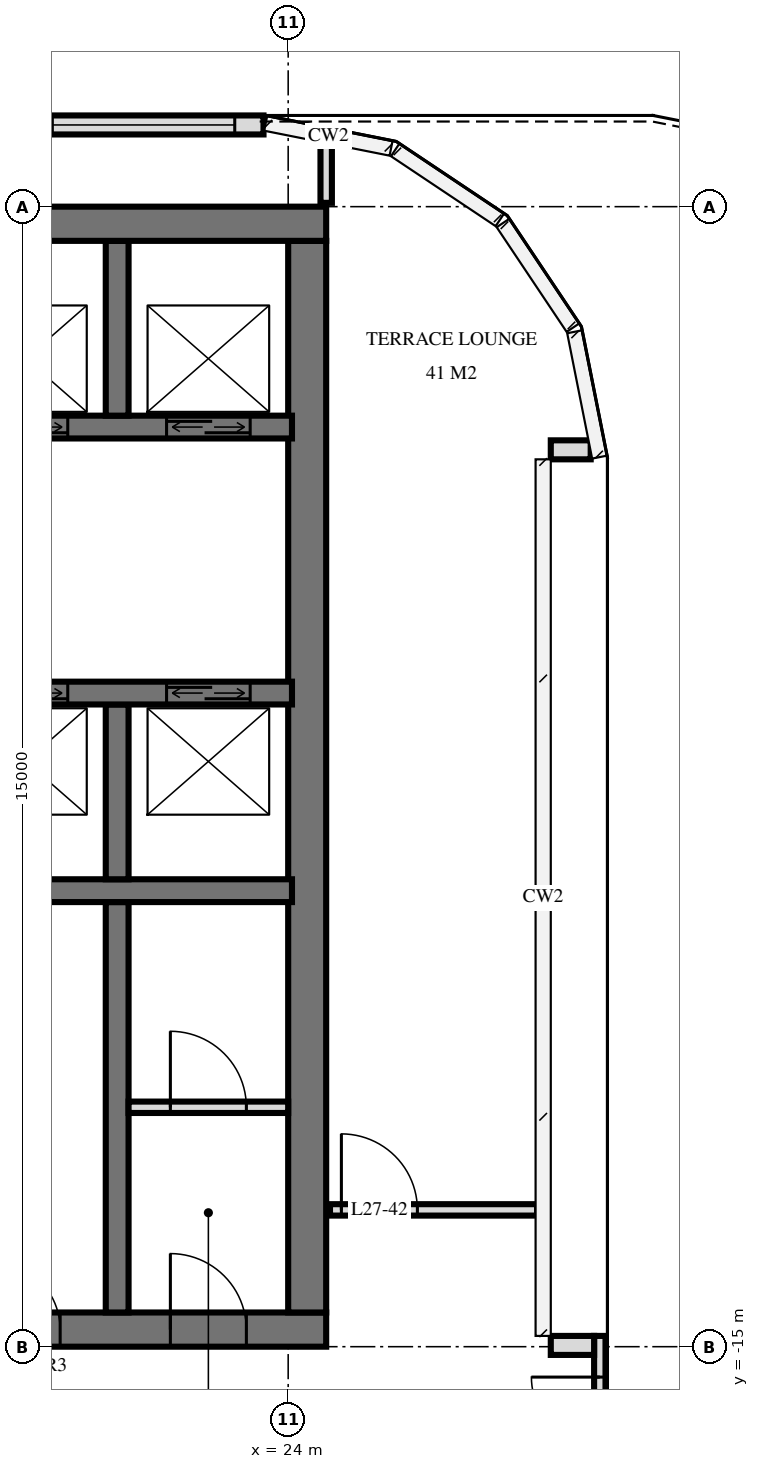
"""IFC4 building model, lengths in metres.
Left out: names, types, materials, properties, quantities, classifications, styles, units other than length and angle.
Written with IfcOpenShell. Run it as: python <this file> out.ifc"""

import sys

from ifc_helpers import new_model, si_unit, direction, frame, frame_2d, origin, place, context, subcontext, project, spatial, rectangle, extrude, element, fill, save


model = new_model("IFC4")
c1 = context("Model", 3, precision=1e-05, world=origin(), true_north=direction((0.0, 1.0)))
c2 = subcontext(c1, "Body", "Model", "MODEL_VIEW")
j1 = project(units=[si_unit("LENGTHUNIT", "METRE"), si_unit("PLANEANGLEUNIT", "RADIAN")], contexts=[c1])
p1 = place(None, origin())
s1 = spatial("IfcSite", under=j1, at=p1, CompositionType="ELEMENT")
p2 = place(p1, origin())
s2 = spatial("IfcBuilding", under=s1, at=p2, CompositionType="ELEMENT")
p3 = place(p2, frame((0.0, 0.0, 106.8)))
s3 = spatial("IfcBuildingStorey", under=s2, at=p3, CompositionType="ELEMENT", Elevation=106.8)
p4 = place(p3, frame((10.0, -0.225, 0.0), z_axis=(0.0, 0.0, 1.0), x_axis=(1.0, 0.0, 0.0)))
e1 = element("IfcWall", 1, at=p4, inside=s3, PredefinedType="SHEAR", context=c2, shape_type="SweptSolid", body=[
    extrude(rectangle(XDim=14.5, YDim=0.45, at=frame_2d((7.25, 0.0))), origin(), (0.0, 0.0, 1.0), 6.0),
])
p5 = place(p3, frame((10.0, -14.775, 0.0), z_axis=(0.0, 0.0, 1.0), x_axis=(1.0, 0.0, 0.0)))
e2 = element("IfcWall", 2, at=p5, inside=s3, PredefinedType="SHEAR", context=c2, shape_type="SweptSolid", body=[
    extrude(rectangle(XDim=14.5, YDim=0.45, at=frame_2d((7.25, 0.0))), origin(), (0.0, 0.0, 1.0), 6.0),
])
p6 = place(p5, frame((6.5, 0.0, 0.0)))
e3 = element("IfcOpeningElement", 3, at=p6, cuts=e2, PredefinedType="OPENING", context=c2, shape_type="SweptSolid", body=[
    extrude(rectangle(XDim=1.2, YDim=2.1, at=frame_2d((0.6, 1.05))), frame((0.0, 0.235, 0.0), z_axis=(0.0, -1.0, 0.0), x_axis=(1.0, 0.0, 0.0)), (0.0, 0.0, 1.0), 0.47),
])
p7 = place(p5, frame((4.15, 0.0, 0.0)))
e4 = element("IfcOpeningElement", 4, at=p7, cuts=e2, PredefinedType="OPENING", context=c2, shape_type="SweptSolid", body=[
    extrude(rectangle(XDim=1.1, YDim=2.1, at=frame_2d((0.55, 1.05))), frame((0.0, 0.235, 0.0), z_axis=(0.0, -1.0, 0.0), x_axis=(1.0, 0.0, 0.0)), (0.0, 0.0, 1.0), 0.47),
])
p8 = place(p5, frame((10.1, 0.0, 0.0)))
e5 = element("IfcOpeningElement", 5, at=p8, cuts=e2, PredefinedType="OPENING", context=c2, shape_type="SweptSolid", body=[
    extrude(rectangle(XDim=0.9, YDim=2.1, at=frame_2d((0.45, 1.05))), frame((0.0, 0.235, 0.0), z_axis=(0.0, -1.0, 0.0), x_axis=(1.0, 0.0, 0.0)), (0.0, 0.0, 1.0), 0.47),
])
p9 = place(p5, frame((12.45, 0.0, 0.0)))
e6 = element("IfcOpeningElement", 6, at=p9, cuts=e2, PredefinedType="OPENING", context=c2, shape_type="SweptSolid", body=[
    extrude(rectangle(XDim=1.0, YDim=2.1, at=frame_2d((0.5, 1.05))), frame((0.0, 0.235, 0.0), z_axis=(0.0, -1.0, 0.0), x_axis=(1.0, 0.0, 0.0)), (0.0, 0.0, 1.0), 0.47),
])
p10 = place(p3, frame((24.25, -14.55, 0.0), z_axis=(0.0, 0.0, 1.0), x_axis=(0.0, 1.0, 0.0)))
e7 = element("IfcWall", 7, at=p10, inside=s3, PredefinedType="SHEAR", context=c2, shape_type="SweptSolid", body=[
    extrude(rectangle(XDim=14.1, YDim=0.5, at=frame_2d((7.05, 0.0))), origin(), (0.0, 0.0, 1.0), 6.0),
])
p11 = place(p3, frame((10.35, -2.9, 0.0), z_axis=(0.0, 0.0, 1.0), x_axis=(1.0, 0.0, 0.0)))
e8 = element("IfcWall", 8, at=p11, inside=s3, PredefinedType="SHEAR", context=c2, shape_type="SweptSolid", body=[
    extrude(rectangle(XDim=13.7, YDim=0.3, at=frame_2d((6.85, 0.0))), origin(), (0.0, 0.0, 1.0), 6.0),
])
p12 = place(p11, frame((9.65, 0.0, 0.0)))
e9 = element("IfcOpeningElement", 9, at=p12, cuts=e8, PredefinedType="OPENING", context=c2, shape_type="SweptSolid", body=[
    extrude(rectangle(XDim=1.1, YDim=2.1, at=frame_2d((0.55, 1.05))), frame((0.0, 0.16, 0.0), z_axis=(0.0, -1.0, 0.0), x_axis=(1.0, 0.0, 0.0)), (0.0, 0.0, 1.0), 0.32),
])
p13 = place(p11, frame((12.05, 0.0, 0.0)))
e10 = element("IfcOpeningElement", 10, at=p13, cuts=e8, PredefinedType="OPENING", context=c2, shape_type="SweptSolid", body=[
    extrude(rectangle(XDim=1.1, YDim=2.1, at=frame_2d((0.55, 1.05))), frame((0.0, 0.16, 0.0), z_axis=(0.0, -1.0, 0.0), x_axis=(1.0, 0.0, 0.0)), (0.0, 0.0, 1.0), 0.32),
])
p14 = place(p11, frame((6.188, 0.0, 0.0)))
e11 = element("IfcOpeningElement", 11, at=p14, cuts=e8, PredefinedType="OPENING", context=c2, shape_type="SweptSolid", body=[
    extrude(rectangle(XDim=0.9, YDim=2.1, at=frame_2d((0.45, 1.05))), frame((0.0, 0.16, 0.0), z_axis=(0.0, -1.0, 0.0), x_axis=(1.0, 0.0, 0.0)), (0.0, 0.0, 1.0), 0.32),
])
p15 = place(p11, frame((7.613, 0.0, 0.0)))
e12 = element("IfcOpeningElement", 12, at=p15, cuts=e8, PredefinedType="OPENING", context=c2, shape_type="SweptSolid", body=[
    extrude(rectangle(XDim=0.9, YDim=2.1, at=frame_2d((0.45, 1.05))), frame((0.0, 0.16, 0.0), z_axis=(0.0, -1.0, 0.0), x_axis=(1.0, 0.0, 0.0)), (0.0, 0.0, 1.0), 0.32),
])
p16 = place(p11, frame((0.137, 0.0, 0.0)))
e13 = element("IfcOpeningElement", 13, at=p16, cuts=e8, PredefinedType="OPENING", context=c2, shape_type="SweptSolid", body=[
    extrude(rectangle(XDim=1.0, YDim=2.1, at=frame_2d((0.5, 1.05))), frame((0.0, 0.16, 0.0), z_axis=(0.0, -1.0, 0.0), x_axis=(1.0, 0.0, 0.0)), (0.0, 0.0, 1.0), 0.32),
])
p17 = place(p11, frame((1.562, 0.0, 0.0)))
e14 = element("IfcOpeningElement", 14, at=p17, cuts=e8, PredefinedType="OPENING", context=c2, shape_type="SweptSolid", body=[
    extrude(rectangle(XDim=1.0, YDim=2.1, at=frame_2d((0.5, 1.05))), frame((0.0, 0.16, 0.0), z_axis=(0.0, -1.0, 0.0), x_axis=(1.0, 0.0, 0.0)), (0.0, 0.0, 1.0), 0.32),
])
p18 = place(p11, frame((3.85, 0.0, 0.0)))
e15 = element("IfcOpeningElement", 15, at=p18, cuts=e8, PredefinedType="OPENING", context=c2, shape_type="SweptSolid", body=[
    extrude(rectangle(XDim=1.0, YDim=2.1, at=frame_2d((0.5, 1.05))), frame((0.0, 0.16, 0.0), z_axis=(0.0, -1.0, 0.0), x_axis=(1.0, 0.0, 0.0)), (0.0, 0.0, 1.0), 0.32),
])
p19 = place(p3, frame((10.35, -6.4, 0.0), z_axis=(0.0, 0.0, 1.0), x_axis=(1.0, 0.0, 0.0)))
e16 = element("IfcWall", 16, at=p19, inside=s3, PredefinedType="SHEAR", context=c2, shape_type="SweptSolid", body=[
    extrude(rectangle(XDim=13.7, YDim=0.3, at=frame_2d((6.85, 0.0))), origin(), (0.0, 0.0, 1.0), 6.0),
])
p20 = place(p19, frame((9.65, 0.0, 0.0)))
e17 = element("IfcOpeningElement", 17, at=p20, cuts=e16, PredefinedType="OPENING", context=c2, shape_type="SweptSolid", body=[
    extrude(rectangle(XDim=1.1, YDim=2.1, at=frame_2d((0.55, 1.05))), frame((0.0, 0.16, 0.0), z_axis=(0.0, -1.0, 0.0), x_axis=(1.0, 0.0, 0.0)), (0.0, 0.0, 1.0), 0.32),
])
p21 = place(p19, frame((12.05, 0.0, 0.0)))
e18 = element("IfcOpeningElement", 18, at=p21, cuts=e16, PredefinedType="OPENING", context=c2, shape_type="SweptSolid", body=[
    extrude(rectangle(XDim=1.1, YDim=2.1, at=frame_2d((0.55, 1.05))), frame((0.0, 0.16, 0.0), z_axis=(0.0, -1.0, 0.0), x_axis=(1.0, 0.0, 0.0)), (0.0, 0.0, 1.0), 0.32),
])
p22 = place(p19, frame((6.8, 0.0, 0.0)))
e19 = element("IfcOpeningElement", 19, at=p22, cuts=e16, PredefinedType="OPENING", context=c2, shape_type="SweptSolid", body=[
    extrude(rectangle(XDim=1.1, YDim=2.1, at=frame_2d((0.55, 1.05))), frame((0.0, 0.16, 0.0), z_axis=(0.0, -1.0, 0.0), x_axis=(1.0, 0.0, 0.0)), (0.0, 0.0, 1.0), 0.32),
])
p23 = place(p3, frame((10.35, -9.0, 0.0), z_axis=(0.0, 0.0, 1.0), x_axis=(1.0, 0.0, 0.0)))
e20 = element("IfcWall", 20, at=p23, inside=s3, PredefinedType="SHEAR", context=c2, shape_type="SweptSolid", body=[
    extrude(rectangle(XDim=13.7, YDim=0.3, at=frame_2d((6.85, 0.0))), origin(), (0.0, 0.0, 1.0), 6.0),
])
p24 = place(p23, frame((3.8, 0.0, 0.0)))
e21 = element("IfcOpeningElement", 21, at=p24, cuts=e20, PredefinedType="OPENING", context=c2, shape_type="SweptSolid", body=[
    extrude(rectangle(XDim=1.1, YDim=2.1, at=frame_2d((0.55, 1.05))), frame((0.0, 0.16, 0.0), z_axis=(0.0, -1.0, 0.0), x_axis=(1.0, 0.0, 0.0)), (0.0, 0.0, 1.0), 0.32),
])
for number, where, z_axis, x_axis in (
    (22, (21.75, -2.75, 0.0), (0.0, 0.0, 1.0), (0.0, 1.0, 0.0)),
    (23, (21.75, -8.85, 0.0), (0.0, 0.0, 1.0), (0.0, 1.0, 0.0)),
):
    element("IfcWall", number, at=place(p3, frame(where, z_axis=z_axis, x_axis=x_axis)), inside=s3, PredefinedType="SHEAR", context=c2, shape_type="SweptSolid", body=[
        extrude(rectangle(XDim=2.3, YDim=0.3, at=frame_2d((1.15, 0.0))), origin(), (0.0, 0.0, 1.0), 6.0),
    ])
p25 = place(p3, frame((21.75, -14.55, 0.0), z_axis=(0.0, 0.0, 1.0), x_axis=(0.0, 1.0, 0.0)))
e24 = element("IfcWall", 24, at=p25, inside=s3, PredefinedType="SHEAR", context=c2, shape_type="SweptSolid", body=[
    extrude(rectangle(XDim=5.4, YDim=0.3, at=frame_2d((2.7, 0.0))), origin(), (0.0, 0.0, 1.0), 6.0),
])
p26 = place(p3, frame((23.675, 1.075, 0.0), z_axis=(0.0, 0.0, 1.0), x_axis=(-1.0, 0.0, 0.0)))
e25 = element("IfcWall", 25, at=p26, inside=s3, PredefinedType="SOLIDWALL", context=c2, shape_type="SweptSolid", body=[
    extrude(rectangle(XDim=47.351, YDim=0.25, at=frame_2d((23.675, 0.0))), origin(), (0.0, 0.0, 1.0), 5.72),
])
p27 = place(p26, frame((0.378, 0.0, 0.858)))
e26 = element("IfcOpeningElement", 26, at=p27, cuts=e25, PredefinedType="OPENING", context=c2, shape_type="SweptSolid", body=[
    extrude(rectangle(XDim=2.4, YDim=3.6, at=frame_2d((1.2, 1.8))), frame((0.0, 0.135, 0.0), z_axis=(0.0, -1.0, 0.0), x_axis=(1.0, 0.0, 0.0)), (0.0, 0.0, 1.0), 0.27),
])
p28 = place(p26, frame((3.535, 0.0, 0.858)))
e27 = element("IfcOpeningElement", 27, at=p28, cuts=e25, PredefinedType="OPENING", context=c2, shape_type="SweptSolid", body=[
    extrude(rectangle(XDim=2.4, YDim=3.6, at=frame_2d((1.2, 1.8))), frame((0.0, 0.135, 0.0), z_axis=(0.0, -1.0, 0.0), x_axis=(1.0, 0.0, 0.0)), (0.0, 0.0, 1.0), 0.27),
])
p29 = place(p26, frame((6.692, 0.0, 0.858)))
e28 = element("IfcOpeningElement", 28, at=p29, cuts=e25, PredefinedType="OPENING", context=c2, shape_type="SweptSolid", body=[
    extrude(rectangle(XDim=2.4, YDim=3.6, at=frame_2d((1.2, 1.8))), frame((0.0, 0.135, 0.0), z_axis=(0.0, -1.0, 0.0), x_axis=(1.0, 0.0, 0.0)), (0.0, 0.0, 1.0), 0.27),
])
p30 = place(p26, frame((9.848, 0.0, 0.858)))
e29 = element("IfcOpeningElement", 29, at=p30, cuts=e25, PredefinedType="OPENING", context=c2, shape_type="SweptSolid", body=[
    extrude(rectangle(XDim=2.4, YDim=3.6, at=frame_2d((1.2, 1.8))), frame((0.0, 0.135, 0.0), z_axis=(0.0, -1.0, 0.0), x_axis=(1.0, 0.0, 0.0)), (0.0, 0.0, 1.0), 0.27),
])
p31 = place(p26, frame((13.005, 0.0, 0.858)))
e30 = element("IfcOpeningElement", 30, at=p31, cuts=e25, PredefinedType="OPENING", context=c2, shape_type="SweptSolid", body=[
    extrude(rectangle(XDim=2.4, YDim=3.6, at=frame_2d((1.2, 1.8))), frame((0.0, 0.135, 0.0), z_axis=(0.0, -1.0, 0.0), x_axis=(1.0, 0.0, 0.0)), (0.0, 0.0, 1.0), 0.27),
])
p32 = place(p26, frame((16.162, 0.0, 0.858)))
e31 = element("IfcOpeningElement", 31, at=p32, cuts=e25, PredefinedType="OPENING", context=c2, shape_type="SweptSolid", body=[
    extrude(rectangle(XDim=2.4, YDim=3.6, at=frame_2d((1.2, 1.8))), frame((0.0, 0.135, 0.0), z_axis=(0.0, -1.0, 0.0), x_axis=(1.0, 0.0, 0.0)), (0.0, 0.0, 1.0), 0.27),
])
p33 = place(p26, frame((19.319, 0.0, 0.858)))
e32 = element("IfcOpeningElement", 32, at=p33, cuts=e25, PredefinedType="OPENING", context=c2, shape_type="SweptSolid", body=[
    extrude(rectangle(XDim=2.4, YDim=3.6, at=frame_2d((1.2, 1.8))), frame((0.0, 0.135, 0.0), z_axis=(0.0, -1.0, 0.0), x_axis=(1.0, 0.0, 0.0)), (0.0, 0.0, 1.0), 0.27),
])
p34 = place(p26, frame((22.475, 0.0, 0.858)))
e33 = element("IfcOpeningElement", 33, at=p34, cuts=e25, PredefinedType="OPENING", context=c2, shape_type="SweptSolid", body=[
    extrude(rectangle(XDim=2.4, YDim=3.6, at=frame_2d((1.2, 1.8))), frame((0.0, 0.135, 0.0), z_axis=(0.0, -1.0, 0.0), x_axis=(1.0, 0.0, 0.0)), (0.0, 0.0, 1.0), 0.27),
])
p35 = place(p26, frame((25.632, 0.0, 0.858)))
e34 = element("IfcOpeningElement", 34, at=p35, cuts=e25, PredefinedType="OPENING", context=c2, shape_type="SweptSolid", body=[
    extrude(rectangle(XDim=2.4, YDim=3.6, at=frame_2d((1.2, 1.8))), frame((0.0, 0.135, 0.0), z_axis=(0.0, -1.0, 0.0), x_axis=(1.0, 0.0, 0.0)), (0.0, 0.0, 1.0), 0.27),
])
p36 = place(p26, frame((28.789, 0.0, 0.858)))
e35 = element("IfcOpeningElement", 35, at=p36, cuts=e25, PredefinedType="OPENING", context=c2, shape_type="SweptSolid", body=[
    extrude(rectangle(XDim=2.4, YDim=3.6, at=frame_2d((1.2, 1.8))), frame((0.0, 0.135, 0.0), z_axis=(0.0, -1.0, 0.0), x_axis=(1.0, 0.0, 0.0)), (0.0, 0.0, 1.0), 0.27),
])
p37 = place(p26, frame((31.946, 0.0, 0.858)))
e36 = element("IfcOpeningElement", 36, at=p37, cuts=e25, PredefinedType="OPENING", context=c2, shape_type="SweptSolid", body=[
    extrude(rectangle(XDim=2.4, YDim=3.6, at=frame_2d((1.2, 1.8))), frame((0.0, 0.135, 0.0), z_axis=(0.0, -1.0, 0.0), x_axis=(1.0, 0.0, 0.0)), (0.0, 0.0, 1.0), 0.27),
])
p38 = place(p26, frame((35.102, 0.0, 0.858)))
e37 = element("IfcOpeningElement", 37, at=p38, cuts=e25, PredefinedType="OPENING", context=c2, shape_type="SweptSolid", body=[
    extrude(rectangle(XDim=2.4, YDim=3.6, at=frame_2d((1.2, 1.8))), frame((0.0, 0.135, 0.0), z_axis=(0.0, -1.0, 0.0), x_axis=(1.0, 0.0, 0.0)), (0.0, 0.0, 1.0), 0.27),
])
p39 = place(p26, frame((38.259, 0.0, 0.858)))
e38 = element("IfcOpeningElement", 38, at=p39, cuts=e25, PredefinedType="OPENING", context=c2, shape_type="SweptSolid", body=[
    extrude(rectangle(XDim=2.4, YDim=3.6, at=frame_2d((1.2, 1.8))), frame((0.0, 0.135, 0.0), z_axis=(0.0, -1.0, 0.0), x_axis=(1.0, 0.0, 0.0)), (0.0, 0.0, 1.0), 0.27),
])
p40 = place(p26, frame((41.416, 0.0, 0.858)))
e39 = element("IfcOpeningElement", 39, at=p40, cuts=e25, PredefinedType="OPENING", context=c2, shape_type="SweptSolid", body=[
    extrude(rectangle(XDim=2.4, YDim=3.6, at=frame_2d((1.2, 1.8))), frame((0.0, 0.135, 0.0), z_axis=(0.0, -1.0, 0.0), x_axis=(1.0, 0.0, 0.0)), (0.0, 0.0, 1.0), 0.27),
])
p41 = place(p26, frame((44.573, 0.0, 0.858)))
e40 = element("IfcOpeningElement", 40, at=p41, cuts=e25, PredefinedType="OPENING", context=c2, shape_type="SweptSolid", body=[
    extrude(rectangle(XDim=2.4, YDim=3.6, at=frame_2d((1.2, 1.8))), frame((0.0, 0.135, 0.0), z_axis=(0.0, -1.0, 0.0), x_axis=(1.0, 0.0, 0.0)), (0.0, 0.0, 1.0), 0.27),
])
p42 = place(p3, frame((27.455, -14.983, 0.0), z_axis=(0.0, 0.0, 1.0), x_axis=(1.0, 0.0, 0.0)))
e41 = element("IfcWall", 41, at=p42, inside=s3, PredefinedType="SOLIDWALL", context=c2, shape_type="SweptSolid", body=[
    extrude(rectangle(XDim=0.57, YDim=0.25, at=frame_2d((0.285, 0.0))), origin(), (0.0, 0.0, 1.0), 4.72),
])
p43 = place(p3, frame((28.1, -17.742, 0.0), z_axis=(0.0, 0.0, 1.0), x_axis=(0.0, 1.0, 0.0)))
e42 = element("IfcWall", 42, at=p43, inside=s3, PredefinedType="USERDEFINED", context=c2, shape_type="SweptSolid", body=[
    extrude(rectangle(XDim=2.883, YDim=0.15, at=frame_2d((1.442, 0.0))), origin(), (0.0, 0.0, 1.0), 5.72),
])
p44 = place(p43, frame((0.542, 0.0, 0.0)))
e43 = element("IfcOpeningElement", 43, at=p44, cuts=e42, PredefinedType="OPENING", context=c2, shape_type="SweptSolid", body=[
    extrude(rectangle(XDim=1.8, YDim=2.4, at=frame_2d((0.9, 1.2))), frame((0.0, 0.085, 0.0), z_axis=(0.0, -1.0, 0.0), x_axis=(1.0, 0.0, 0.0)), (0.0, 0.0, 1.0), 0.17),
])
p45 = place(p3, frame((27.455, -3.2, 0.0), z_axis=(0.0, 0.0, 1.0), x_axis=(1.0, 0.0, 0.0)))
e44 = element("IfcWall", 44, at=p45, inside=s3, PredefinedType="SOLIDWALL", context=c2, shape_type="SweptSolid", body=[
    extrude(rectangle(XDim=0.525, YDim=0.25, at=frame_2d((0.262, 0.0))), origin(), (0.0, 0.0, 1.0), 5.72),
])
p46 = place(p3, frame((21.9, -11.85, 0.0), z_axis=(0.0, 0.0, 1.0), x_axis=(1.0, 0.0, 0.0)))
e45 = element("IfcWall", 45, at=p46, inside=s3, PredefinedType="PARTITIONING", context=c2, shape_type="SweptSolid", body=[
    extrude(rectangle(XDim=2.1, YDim=0.15, at=frame_2d((1.05, 0.0))), origin(), (0.0, 0.0, 1.0), 5.7),
])
p47 = place(p46, frame((0.55, 0.0, 0.0)))
e46 = element("IfcOpeningElement", 46, at=p47, cuts=e45, PredefinedType="OPENING", context=c2, shape_type="SweptSolid", body=[
    extrude(rectangle(XDim=1.0, YDim=2.1, at=frame_2d((0.5, 1.05))), frame((0.0, 0.085, 0.0), z_axis=(0.0, -1.0, 0.0), x_axis=(1.0, 0.0, 0.0)), (0.0, 0.0, 1.0), 0.17),
])
p48 = place(p3, frame((24.5, 0.05, 0.0), z_axis=(0.0, 0.0, 1.0), x_axis=(0.0, 1.0, 0.0)))
e47 = element("IfcWall", 47, at=p48, inside=s3, PredefinedType="PARTITIONING", context=c2, shape_type="SweptSolid", body=[
    extrude(rectangle(XDim=0.807, YDim=0.15, at=frame_2d((0.404, 0.0))), origin(), (0.0, 0.0, 1.0), 5.7),
])
p49 = place(p3, frame((24.55, -13.2, 0.0), z_axis=(0.0, 0.0, 1.0), x_axis=(1.0, 0.0, 0.0)))
e48 = element("IfcWall", 48, at=p49, inside=s3, PredefinedType="PARTITIONING", context=c2, shape_type="SweptSolid", body=[
    extrude(rectangle(XDim=2.725, YDim=0.15, at=frame_2d((1.362, 0.0))), origin(), (0.0, 0.0, 1.0), 5.7),
])
p50 = place(p49, frame((0.15, 0.0, 0.0)))
e49 = element("IfcOpeningElement", 49, at=p50, cuts=e48, PredefinedType="OPENING", context=c2, shape_type="SweptSolid", body=[
    extrude(rectangle(XDim=1.0, YDim=2.1, at=frame_2d((0.5, 1.05))), frame((0.0, 0.085, 0.0), z_axis=(0.0, -1.0, 0.0), x_axis=(1.0, 0.0, 0.0)), (0.0, 0.0, 1.0), 0.17),
])
p51 = place(p27, origin())
e50 = element("IfcWindow", 50, at=p51, inside=s3, PartitioningType="SINGLE_PANEL", PredefinedType="USERDEFINED", context=c2, shape_type="SweptSolid", body=[
    extrude(rectangle(XDim=2.4, YDim=3.6, at=frame_2d((1.2, 1.8))), frame((0.0, 0.03, 0.0), z_axis=(0.0, -1.0, 0.0), x_axis=(1.0, 0.0, 0.0)), (0.0, 0.0, 1.0), 0.06),
])
fill(e26, e50)
p52 = place(p44, origin())
e51 = element("IfcDoor", 51, at=p52, inside=s3, OperationType="DOUBLE_DOOR_SINGLE_SWING", PredefinedType="DOOR", context=c2, shape_type="SweptSolid", body=[
    extrude(rectangle(XDim=1.8, YDim=2.4, at=frame_2d((0.9, 1.2))), frame((0.0, 0.025, 0.0), z_axis=(0.0, -1.0, 0.0), x_axis=(1.0, 0.0, 0.0)), (0.0, 0.0, 1.0), 0.05),
])
fill(e43, e51)
p53 = place(p12, origin())
e52 = element("IfcDoor", 52, at=p53, inside=s3, OperationType="DOUBLE_DOOR_SLIDING", PredefinedType="USERDEFINED", context=c2, shape_type="SweptSolid", body=[
    extrude(rectangle(XDim=1.1, YDim=2.1, at=frame_2d((0.55, 1.05))), frame((0.0, 0.025, 0.0), z_axis=(0.0, -1.0, 0.0), x_axis=(1.0, 0.0, 0.0)), (0.0, 0.0, 1.0), 0.05),
])
fill(e9, e52)
p54 = place(p20, origin())
e53 = element("IfcDoor", 53, at=p54, inside=s3, OperationType="DOUBLE_DOOR_SLIDING", PredefinedType="USERDEFINED", context=c2, shape_type="SweptSolid", body=[
    extrude(rectangle(XDim=1.1, YDim=2.1, at=frame_2d((0.55, 1.05))), frame((0.0, 0.025, 0.0), z_axis=(0.0, -1.0, 0.0), x_axis=(1.0, 0.0, 0.0)), (0.0, 0.0, 1.0), 0.05),
])
fill(e17, e53)
p55 = place(p13, origin())
e54 = element("IfcDoor", 54, at=p55, inside=s3, OperationType="DOUBLE_DOOR_SLIDING", PredefinedType="USERDEFINED", context=c2, shape_type="SweptSolid", body=[
    extrude(rectangle(XDim=1.1, YDim=2.1, at=frame_2d((0.55, 1.05))), frame((0.0, 0.025, 0.0), z_axis=(0.0, -1.0, 0.0), x_axis=(1.0, 0.0, 0.0)), (0.0, 0.0, 1.0), 0.05),
])
fill(e10, e54)
p56 = place(p21, origin())
e55 = element("IfcDoor", 55, at=p56, inside=s3, OperationType="DOUBLE_DOOR_SLIDING", PredefinedType="USERDEFINED", context=c2, shape_type="SweptSolid", body=[
    extrude(rectangle(XDim=1.1, YDim=2.1, at=frame_2d((0.55, 1.05))), frame((0.0, 0.025, 0.0), z_axis=(0.0, -1.0, 0.0), x_axis=(1.0, 0.0, 0.0)), (0.0, 0.0, 1.0), 0.05),
])
fill(e18, e55)
p57 = place(p8, origin())
e56 = element("IfcDoor", 56, at=p57, inside=s3, OperationType="SINGLE_SWING_RIGHT", PredefinedType="DOOR", context=c2, shape_type="SweptSolid", body=[
    extrude(rectangle(XDim=0.9, YDim=2.1, at=frame_2d((0.45, 1.05))), frame((0.0, 0.025, 0.0), z_axis=(0.0, -1.0, 0.0), x_axis=(1.0, 0.0, 0.0)), (0.0, 0.0, 1.0), 0.05),
])
fill(e5, e56)
p58 = place(p9, origin())
e57 = element("IfcDoor", 57, at=p58, inside=s3, OperationType="SINGLE_SWING_RIGHT", PredefinedType="DOOR", context=c2, shape_type="SweptSolid", body=[
    extrude(rectangle(XDim=1.0, YDim=2.1, at=frame_2d((0.5, 1.05))), frame((0.0, 0.025, 0.0), z_axis=(0.0, -1.0, 0.0), x_axis=(1.0, 0.0, 0.0)), (0.0, 0.0, 1.0), 0.05),
])
fill(e6, e57)
p59 = place(p47, origin())
e58 = element("IfcDoor", 58, at=p59, inside=s3, OperationType="SINGLE_SWING_RIGHT", PredefinedType="DOOR", context=c2, shape_type="SweptSolid", body=[
    extrude(rectangle(XDim=1.0, YDim=2.1, at=frame_2d((0.5, 1.05))), frame((0.0, 0.025, 0.0), z_axis=(0.0, -1.0, 0.0), x_axis=(1.0, 0.0, 0.0)), (0.0, 0.0, 1.0), 0.05),
])
fill(e46, e58)
p60 = place(p50, origin())
e59 = element("IfcDoor", 59, at=p60, inside=s3, OperationType="SINGLE_SWING_RIGHT", PredefinedType="DOOR", context=c2, shape_type="SweptSolid", body=[
    extrude(rectangle(XDim=1.0, YDim=2.1, at=frame_2d((0.5, 1.05))), frame((0.0, 0.025, 0.0), z_axis=(0.0, -1.0, 0.0), x_axis=(1.0, 0.0, 0.0)), (0.0, 0.0, 1.0), 0.05),
])
fill(e49, e59)
save(model, sys.argv[1])
